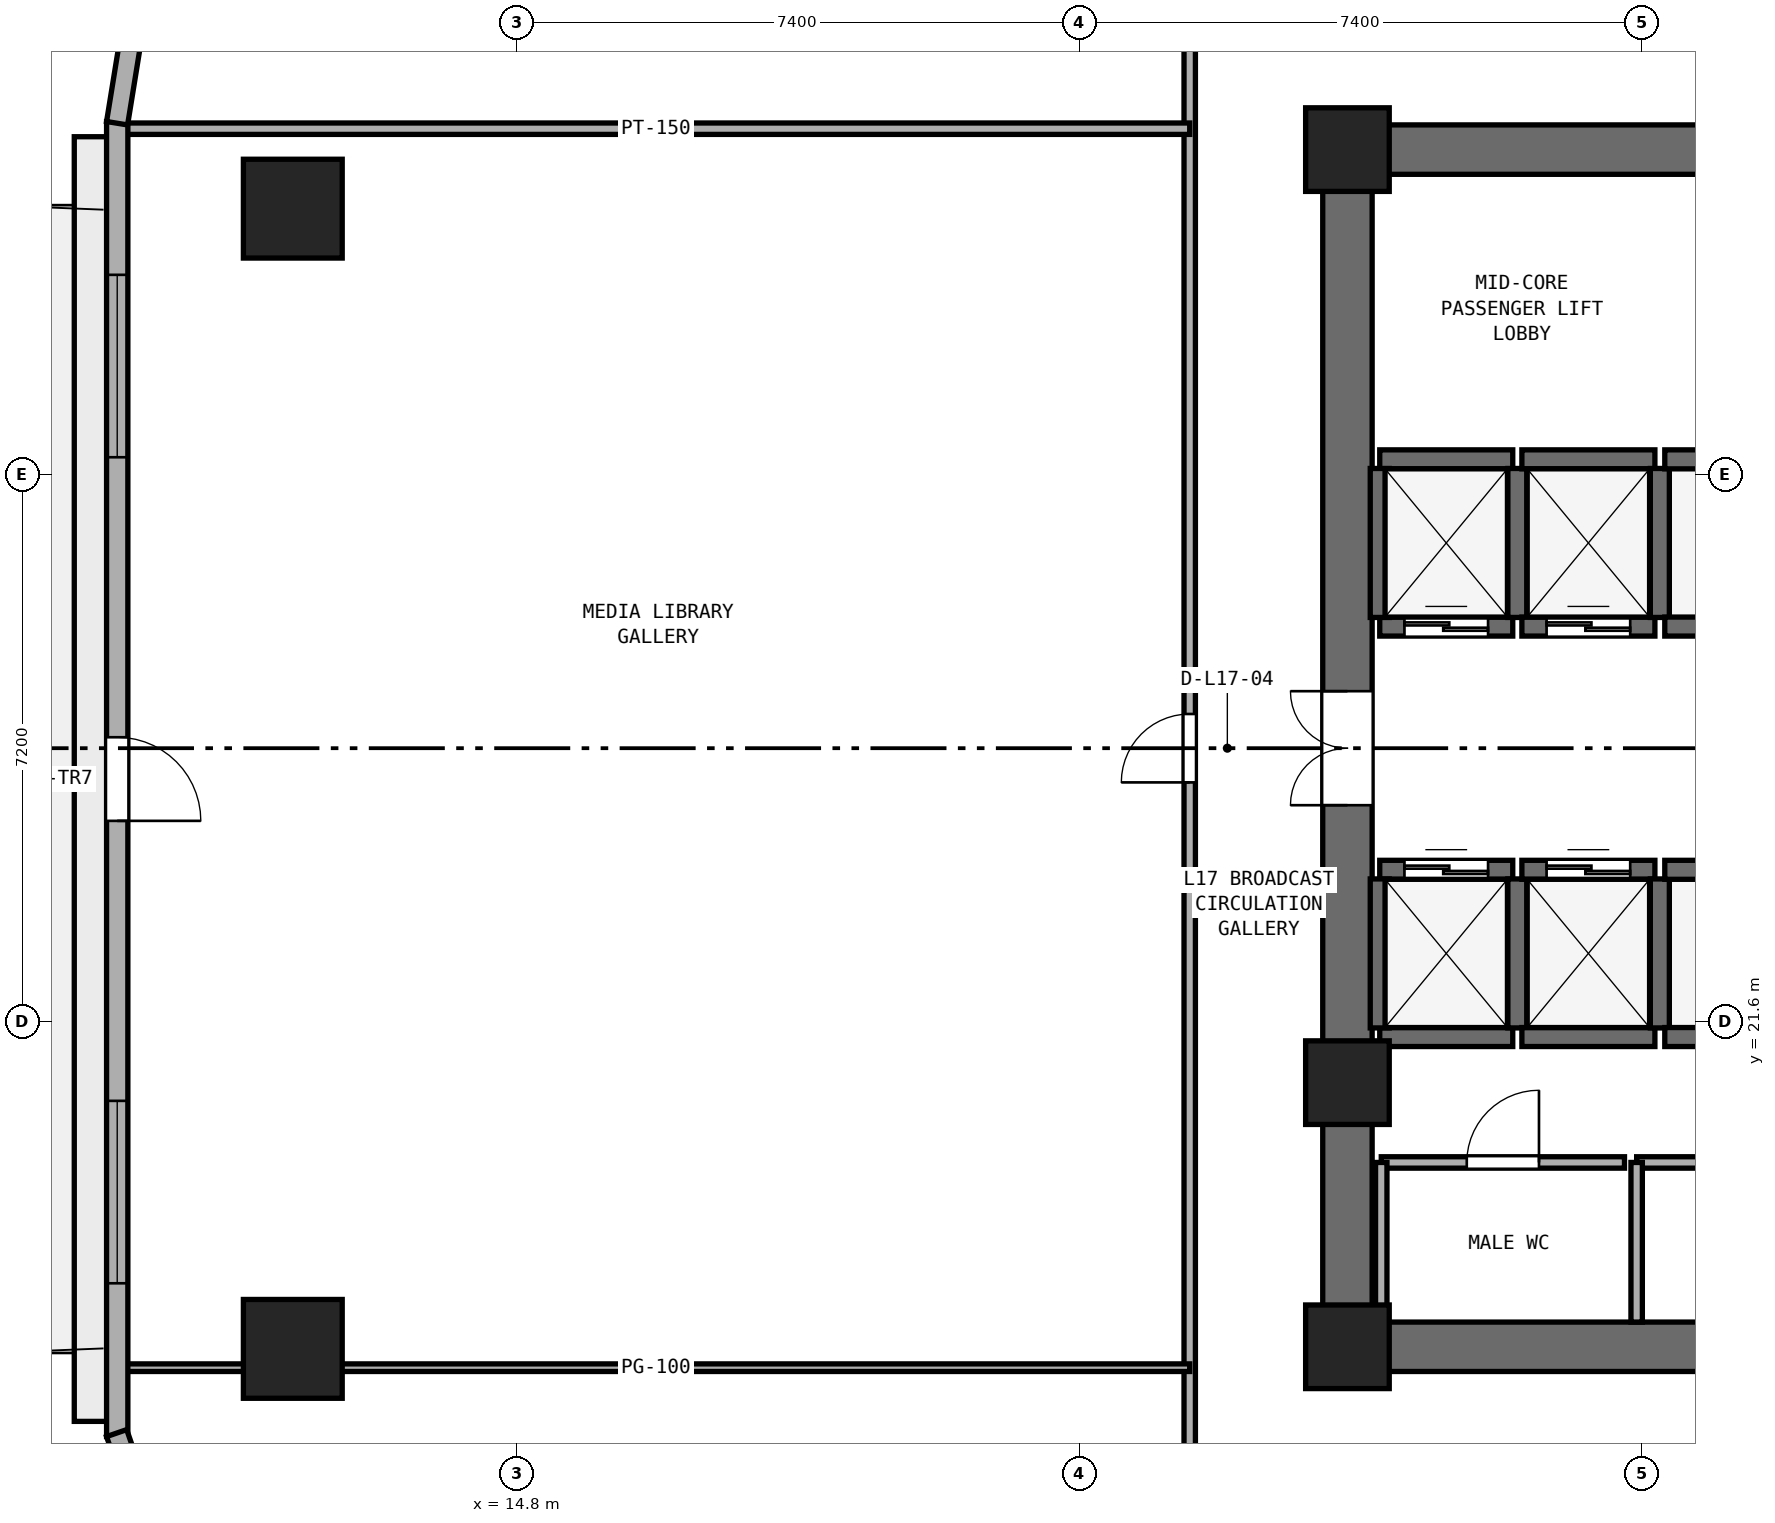
"""IFC4 building model, lengths in metres.
Left out: names, types, materials, properties, quantities, classifications, styles, units other than length and angle.
Written with IfcOpenShell. Run it as: python <this file> out.ifc"""

import sys

from ifc_helpers import new_model, si_unit, direction, frame, frame_2d, origin, origin_2d, place, context, subcontext, project, spatial, rectangle, extrude, element, fill, save


model = new_model("IFC4")
c1 = context("Model", 3, precision=1e-05, world=origin(), true_north=direction((0.0, 1.0)))
c2 = subcontext(c1, "Body", "Model", "MODEL_VIEW")
j1 = project(units=[si_unit("LENGTHUNIT", "METRE"), si_unit("PLANEANGLEUNIT", "RADIAN")], contexts=[c1])
p1 = place(None, origin())
s1 = spatial("IfcSite", under=j1, at=p1, CompositionType="ELEMENT")
p2 = place(p1, origin())
s2 = spatial("IfcBuilding", under=s1, at=p2, CompositionType="ELEMENT")
p3 = place(p2, frame((0.0, 0.0, 70.6)))
s3 = spatial("IfcBuildingStorey", under=s2, at=p3, CompositionType="ELEMENT", Elevation=70.6)
for number, where, z_axis, x_axis in (
    (1, (25.4, 17.325, 0.0), (0.0, 0.0, 1.0), (1.0, 0.0, 0.0)),
    (2, (25.4, 33.075, 0.0), (0.0, 0.0, 1.0), (1.0, 0.0, 0.0)),
):
    element("IfcWall", number, at=place(p3, frame(where, z_axis=z_axis, x_axis=x_axis)), inside=s3, PredefinedType="SHEAR", context=c2, shape_type="SweptSolid", body=[
        extrude(rectangle(XDim=23.2, YDim=0.65, at=frame_2d((11.6, 0.0))), origin(), (0.0, 0.0, 1.0), 3.525),
    ])
p4 = place(p3, frame((25.725, 17.65, 0.0), z_axis=(0.0, 0.0, 1.0), x_axis=(0.0, 1.0, 0.0)))
e3 = element("IfcWall", 3, at=p4, inside=s3, PredefinedType="SHEAR", context=c2, shape_type="SweptSolid", body=[
    extrude(rectangle(XDim=15.1, YDim=0.65, at=frame_2d((7.55, 0.0))), origin(), (0.0, 0.0, 1.0), 3.525),
])
p5 = place(p4, frame((6.8, 0.0, 0.0)))
e4 = element("IfcOpeningElement", 4, at=p5, cuts=e3, PredefinedType="OPENING", context=c2, shape_type="SweptSolid", body=[
    extrude(rectangle(XDim=1.5, YDim=2.15, at=frame_2d((0.75, 1.075))), frame((0.0, 0.335, 0.0), z_axis=(0.0, -1.0, 0.0), x_axis=(1.0, 0.0, 0.0)), (0.0, 0.0, 1.0), 0.67),
])
for number, where, z_axis, x_axis in (
    (5, (25.725, 17.325, 0.0), (0.0, 0.0, 1.0), (1.0, 0.0, 0.0)),
    (6, (25.725, 33.075, 0.0), (0.0, 0.0, 1.0), (1.0, 0.0, 0.0)),
    (7, (25.725, 20.8, 0.0), (0.0, 0.0, 1.0), (1.0, 0.0, 0.0)),
):
    element("IfcColumn", number, at=place(p3, frame(where, z_axis=z_axis, x_axis=x_axis)), inside=s3, PredefinedType="PILASTER", context=c2, shape_type="SweptSolid", body=[
        extrude(rectangle(XDim=1.1, YDim=1.1, at=origin_2d()), origin(), (0.0, 0.0, 1.0), 3.8),
    ])
for number, where, z_axis, x_axis in (
    (8, (11.85, 32.298, 0.0), (0.0, 0.0, 1.0), (1.0, 0.0, 0.0)),
    (9, (11.85, 17.298, 0.0), (0.0, 0.0, 1.0), (1.0, 0.0, 0.0)),
):
    element("IfcColumn", number, at=place(p3, frame(where, z_axis=z_axis, x_axis=x_axis)), inside=s3, PredefinedType="COLUMN", context=c2, shape_type="SweptSolid", body=[
        extrude(rectangle(XDim=1.3, YDim=1.3, at=origin_2d()), origin(), (0.0, 0.0, 1.0), 3.8),
    ])
p6 = place(p3, frame((26.15, 26.8, 0.0), z_axis=(0.0, 0.0, 1.0), x_axis=(1.0, 0.0, 0.0)))
e10 = element("IfcWall", 10, at=p6, inside=s3, PredefinedType="SHEAR", context=c2, shape_type="SweptSolid", body=[
    extrude(rectangle(XDim=1.75, YDim=0.25, at=frame_2d((0.875, 0.0))), origin(), (0.0, 0.0, 1.0), 3.525),
])
p7 = place(p6, frame((0.325, 0.0, 0.0)))
e11 = element("IfcOpeningElement", 11, at=p7, cuts=e10, PredefinedType="OPENING", context=c2, shape_type="SweptSolid", body=[
    extrude(rectangle(XDim=1.1, YDim=2.15, at=frame_2d((0.55, 1.075))), frame((0.0, 0.135, 0.0), z_axis=(0.0, -1.0, 0.0), x_axis=(1.0, 0.0, 0.0)), (0.0, 0.0, 1.0), 0.27),
])
p8 = place(p3, frame((26.15, 29.0, 0.0), z_axis=(0.0, 0.0, 1.0), x_axis=(1.0, 0.0, 0.0)))
e12 = element("IfcWall", 12, at=p8, inside=s3, PredefinedType="SHEAR", context=c2, shape_type="SweptSolid", body=[
    extrude(rectangle(XDim=1.75, YDim=0.25, at=frame_2d((0.875, 0.0))), origin(), (0.0, 0.0, 1.0), 3.525),
])
for number, where, z_axis, x_axis in (
    (13, (26.15, 26.92, 0.0), (0.0, 0.0, 1.0), (0.0, 1.0, 0.0)),
    (14, (27.96, 26.92, 0.0), (0.0, 0.0, 1.0), (0.0, 1.0, 0.0)),
):
    element("IfcWall", number, at=place(p3, frame(where, z_axis=z_axis, x_axis=x_axis)), inside=s3, PredefinedType="SHEAR", context=c2, shape_type="SweptSolid", body=[
        extrude(rectangle(XDim=1.96, YDim=0.25, at=frame_2d((0.98, 0.0))), origin(), (0.0, 0.0, 1.0), 3.525),
    ])
p9 = place(p3, frame((28.02, 26.8, 0.0), z_axis=(0.0, 0.0, 1.0), x_axis=(1.0, 0.0, 0.0)))
e15 = element("IfcWall", 15, at=p9, inside=s3, PredefinedType="SHEAR", context=c2, shape_type="SweptSolid", body=[
    extrude(rectangle(XDim=1.75, YDim=0.25, at=frame_2d((0.875, 0.0))), origin(), (0.0, 0.0, 1.0), 3.525),
])
p10 = place(p9, frame((0.325, 0.0, 0.0)))
e16 = element("IfcOpeningElement", 16, at=p10, cuts=e15, PredefinedType="OPENING", context=c2, shape_type="SweptSolid", body=[
    extrude(rectangle(XDim=1.1, YDim=2.15, at=frame_2d((0.55, 1.075))), frame((0.0, 0.135, 0.0), z_axis=(0.0, -1.0, 0.0), x_axis=(1.0, 0.0, 0.0)), (0.0, 0.0, 1.0), 0.27),
])
p11 = place(p3, frame((28.02, 29.0, 0.0), z_axis=(0.0, 0.0, 1.0), x_axis=(1.0, 0.0, 0.0)))
e17 = element("IfcWall", 17, at=p11, inside=s3, PredefinedType="SHEAR", context=c2, shape_type="SweptSolid", body=[
    extrude(rectangle(XDim=1.75, YDim=0.25, at=frame_2d((0.875, 0.0))), origin(), (0.0, 0.0, 1.0), 3.525),
])
p12 = place(p3, frame((29.835, 26.92, 0.0), z_axis=(0.0, 0.0, 1.0), x_axis=(0.0, 1.0, 0.0)))
e18 = element("IfcWall", 18, at=p12, inside=s3, PredefinedType="SHEAR", context=c2, shape_type="SweptSolid", body=[
    extrude(rectangle(XDim=1.96, YDim=0.25, at=frame_2d((0.98, 0.0))), origin(), (0.0, 0.0, 1.0), 3.525),
])
p13 = place(p3, frame((26.15, 21.4, 0.0), z_axis=(0.0, 0.0, 1.0), x_axis=(1.0, 0.0, 0.0)))
e19 = element("IfcWall", 19, at=p13, inside=s3, PredefinedType="SHEAR", context=c2, shape_type="SweptSolid", body=[
    extrude(rectangle(XDim=1.75, YDim=0.25, at=frame_2d((0.875, 0.0))), origin(), (0.0, 0.0, 1.0), 3.525),
])
p14 = place(p3, frame((26.15, 23.6, 0.0), z_axis=(0.0, 0.0, 1.0), x_axis=(1.0, 0.0, 0.0)))
e20 = element("IfcWall", 20, at=p14, inside=s3, PredefinedType="SHEAR", context=c2, shape_type="SweptSolid", body=[
    extrude(rectangle(XDim=1.75, YDim=0.25, at=frame_2d((0.875, 0.0))), origin(), (0.0, 0.0, 1.0), 3.525),
])
p15 = place(p14, frame((0.325, 0.0, 0.0)))
e21 = element("IfcOpeningElement", 21, at=p15, cuts=e20, PredefinedType="OPENING", context=c2, shape_type="SweptSolid", body=[
    extrude(rectangle(XDim=1.1, YDim=2.15, at=frame_2d((0.55, 1.075))), frame((0.0, 0.135, 0.0), z_axis=(0.0, -1.0, 0.0), x_axis=(1.0, 0.0, 0.0)), (0.0, 0.0, 1.0), 0.27),
])
for number, where, z_axis, x_axis in (
    (22, (26.15, 21.52, 0.0), (0.0, 0.0, 1.0), (0.0, 1.0, 0.0)),
    (23, (27.96, 21.52, 0.0), (0.0, 0.0, 1.0), (0.0, 1.0, 0.0)),
):
    element("IfcWall", number, at=place(p3, frame(where, z_axis=z_axis, x_axis=x_axis)), inside=s3, PredefinedType="SHEAR", context=c2, shape_type="SweptSolid", body=[
        extrude(rectangle(XDim=1.96, YDim=0.25, at=frame_2d((0.98, 0.0))), origin(), (0.0, 0.0, 1.0), 3.525),
    ])
p16 = place(p3, frame((28.02, 21.4, 0.0), z_axis=(0.0, 0.0, 1.0), x_axis=(1.0, 0.0, 0.0)))
e24 = element("IfcWall", 24, at=p16, inside=s3, PredefinedType="SHEAR", context=c2, shape_type="SweptSolid", body=[
    extrude(rectangle(XDim=1.75, YDim=0.25, at=frame_2d((0.875, 0.0))), origin(), (0.0, 0.0, 1.0), 3.525),
])
p17 = place(p3, frame((28.02, 23.6, 0.0), z_axis=(0.0, 0.0, 1.0), x_axis=(1.0, 0.0, 0.0)))
e25 = element("IfcWall", 25, at=p17, inside=s3, PredefinedType="SHEAR", context=c2, shape_type="SweptSolid", body=[
    extrude(rectangle(XDim=1.75, YDim=0.25, at=frame_2d((0.875, 0.0))), origin(), (0.0, 0.0, 1.0), 3.525),
])
p18 = place(p17, frame((0.325, 0.0, 0.0)))
e26 = element("IfcOpeningElement", 26, at=p18, cuts=e25, PredefinedType="OPENING", context=c2, shape_type="SweptSolid", body=[
    extrude(rectangle(XDim=1.1, YDim=2.15, at=frame_2d((0.55, 1.075))), frame((0.0, 0.135, 0.0), z_axis=(0.0, -1.0, 0.0), x_axis=(1.0, 0.0, 0.0)), (0.0, 0.0, 1.0), 0.27),
])
p19 = place(p3, frame((29.835, 21.52, 0.0), z_axis=(0.0, 0.0, 1.0), x_axis=(0.0, 1.0, 0.0)))
e27 = element("IfcWall", 27, at=p19, inside=s3, PredefinedType="SHEAR", context=c2, shape_type="SweptSolid", body=[
    extrude(rectangle(XDim=1.96, YDim=0.25, at=frame_2d((0.98, 0.0))), origin(), (0.0, 0.0, 1.0), 3.525),
])
for number, where, z_axis, x_axis in (
    (28, (29.9, 21.4, 0.0), (0.0, 0.0, 1.0), (1.0, 0.0, 0.0)),
    (29, (29.9, 23.6, 0.0), (0.0, 0.0, 1.0), (1.0, 0.0, 0.0)),
    (30, (29.9, 26.8, 0.0), (0.0, 0.0, 1.0), (1.0, 0.0, 0.0)),
    (31, (29.9, 29.0, 0.0), (0.0, 0.0, 1.0), (1.0, 0.0, 0.0)),
):
    element("IfcWall", number, at=place(p3, frame(where, z_axis=z_axis, x_axis=x_axis)), inside=s3, PredefinedType="SHEAR", context=c2, shape_type="SweptSolid", body=[
        extrude(rectangle(XDim=1.72, YDim=0.25, at=frame_2d((0.86, 0.0))), origin(), (0.0, 0.0, 1.0), 3.525),
    ])
p20 = place(p3, frame((26.17, 19.75, 0.0), z_axis=(0.0, 0.0, 1.0), x_axis=(1.0, 0.0, 0.0)))
e32 = element("IfcWall", 32, at=p20, inside=s3, PredefinedType="PARTITIONING", context=c2, shape_type="SweptSolid", body=[
    extrude(rectangle(XDim=3.2, YDim=0.15, at=frame_2d((1.6, 0.0))), origin(), (0.0, 0.0, 1.0), 3.525),
])
p21 = place(p20, frame((1.125, 0.0, 0.0)))
e33 = element("IfcOpeningElement", 33, at=p21, cuts=e32, PredefinedType="OPENING", context=c2, shape_type="SweptSolid", body=[
    extrude(rectangle(XDim=0.95, YDim=2.1, at=frame_2d((0.475, 1.05))), frame((0.0, 0.085, 0.0), z_axis=(0.0, -1.0, 0.0), x_axis=(1.0, 0.0, 0.0)), (0.0, 0.0, 1.0), 0.17),
])
p22 = place(p3, frame((26.17, 17.65, 0.0), z_axis=(0.0, 0.0, 1.0), x_axis=(0.0, 1.0, 0.0)))
e34 = element("IfcWall", 34, at=p22, inside=s3, PredefinedType="PARTITIONING", context=c2, shape_type="SweptSolid", body=[
    extrude(rectangle(XDim=2.1, YDim=0.15, at=frame_2d((1.05, 0.0))), origin(), (0.0, 0.0, 1.0), 3.525),
])
p23 = place(p3, frame((29.53, 19.75, 0.0), z_axis=(0.0, 0.0, 1.0), x_axis=(1.0, 0.0, 0.0)))
e35 = element("IfcWall", 35, at=p23, inside=s3, PredefinedType="PARTITIONING", context=c2, shape_type="SweptSolid", body=[
    extrude(rectangle(XDim=3.24, YDim=0.15, at=frame_2d((1.62, 0.0))), origin(), (0.0, 0.0, 1.0), 3.525),
])
p24 = place(p23, frame((1.145, 0.0, 0.0)))
e36 = element("IfcOpeningElement", 36, at=p24, cuts=e35, PredefinedType="OPENING", context=c2, shape_type="SweptSolid", body=[
    extrude(rectangle(XDim=0.95, YDim=2.1, at=frame_2d((0.475, 1.05))), frame((0.0, 0.085, 0.0), z_axis=(0.0, -1.0, 0.0), x_axis=(1.0, 0.0, 0.0)), (0.0, 0.0, 1.0), 0.17),
])
p25 = place(p3, frame((29.53, 17.65, 0.0), z_axis=(0.0, 0.0, 1.0), x_axis=(0.0, 1.0, 0.0)))
e37 = element("IfcWall", 37, at=p25, inside=s3, PredefinedType="PARTITIONING", context=c2, shape_type="SweptSolid", body=[
    extrude(rectangle(XDim=2.1, YDim=0.15, at=frame_2d((1.05, 0.0))), origin(), (0.0, 0.0, 1.0), 3.525),
])
p26 = place(p3, frame((23.65, 15.25, 0.0), z_axis=(0.0, 0.0, 1.0), x_axis=(0.0, 1.0, 0.0)))
e38 = element("IfcWall", 38, at=p26, inside=s3, PredefinedType="PARTITIONING", context=c2, shape_type="SweptSolid", body=[
    extrude(rectangle(XDim=19.9, YDim=0.15, at=frame_2d((9.95, 0.0))), origin(), (0.0, 0.0, 1.0), 3.525),
])
p27 = place(p26, frame((9.5, 0.0, 0.0)))
e39 = element("IfcOpeningElement", 39, at=p27, cuts=e38, PredefinedType="OPENING", context=c2, shape_type="SweptSolid", body=[
    extrude(rectangle(XDim=0.9, YDim=2.1, at=frame_2d((0.45, 1.05))), frame((0.0, 0.085, 0.0), z_axis=(0.0, -1.0, 0.0), x_axis=(1.0, 0.0, 0.0)), (0.0, 0.0, 1.0), 0.17),
])
p28 = place(p3, frame((9.605, 17.05, 0.0), z_axis=(0.0, 0.0, 1.0), x_axis=(1.0, 0.0, 0.0)))
e40 = element("IfcWall", 40, at=p28, inside=s3, PredefinedType="PARTITIONING", context=c2, shape_type="SweptSolid", body=[
    extrude(rectangle(XDim=14.045, YDim=0.1, at=frame_2d((7.022, 0.0))), origin(), (0.0, 0.0, 1.0), 3.525),
])
p29 = place(p3, frame((9.605, 33.35, 0.0), z_axis=(0.0, 0.0, 1.0), x_axis=(1.0, 0.0, 0.0)))
e41 = element("IfcWall", 41, at=p29, inside=s3, PredefinedType="PARTITIONING", context=c2, shape_type="SweptSolid", body=[
    extrude(rectangle(XDim=14.045, YDim=0.15, at=frame_2d((7.022, 0.0))), origin(), (0.0, 0.0, 1.0), 3.525),
])
p30 = place(p3, frame((9.54, 33.444, 0.0), z_axis=(0.0, 0.0, 1.0), x_axis=(0.0, -1.0, 0.0)))
e42 = element("IfcWall", 42, at=p30, inside=s3, PredefinedType="STANDARD", context=c2, shape_type="SweptSolid", body=[
    extrude(rectangle(XDim=17.301, YDim=0.28, at=frame_2d((8.65, 0.0))), origin(), (0.0, 0.0, 1.0), 3.525),
])
p31 = place(p30, frame((8.1, 0.0, 0.0)))
e43 = element("IfcOpeningElement", 43, at=p31, cuts=e42, PredefinedType="OPENING", context=c2, shape_type="SweptSolid", body=[
    extrude(rectangle(XDim=1.1, YDim=2.2, at=frame_2d((0.55, 1.1))), frame((0.0, 0.15, 0.0), z_axis=(0.0, -1.0, 0.0), x_axis=(1.0, 0.0, 0.0)), (0.0, 0.0, 1.0), 0.3),
])
p32 = place(p30, frame((2.017, 0.0, 0.9)))
e44 = element("IfcOpeningElement", 44, at=p32, cuts=e42, PredefinedType="OPENING", context=c2, shape_type="SweptSolid", body=[
    extrude(rectangle(XDim=2.4, YDim=1.75, at=frame_2d((1.2, 0.875))), frame((0.0, 0.15, 0.0), z_axis=(0.0, -1.0, 0.0), x_axis=(1.0, 0.0, 0.0)), (0.0, 0.0, 1.0), 0.3),
])
p33 = place(p30, frame((12.884, 0.0, 0.9)))
e45 = element("IfcOpeningElement", 45, at=p33, cuts=e42, PredefinedType="OPENING", context=c2, shape_type="SweptSolid", body=[
    extrude(rectangle(XDim=2.4, YDim=1.75, at=frame_2d((1.2, 0.875))), frame((0.0, 0.15, 0.0), z_axis=(0.0, -1.0, 0.0), x_axis=(1.0, 0.0, 0.0)), (0.0, 0.0, 1.0), 0.3),
])
p34 = place(p3, frame((9.753, 34.749, 0.0), z_axis=(0.0, 0.0, 1.0), x_axis=(-0.160037671962, -0.987110907423, 0.0)))
e46 = element("IfcWall", 46, at=p34, inside=s3, PredefinedType="STANDARD", context=c2, shape_type="SweptSolid", body=[
    extrude(rectangle(XDim=1.344, YDim=0.28, at=frame_2d((0.672, 0.0))), origin(), (0.0, 0.0, 1.0), 3.525),
])
p35 = place(p3, frame((9.532, 16.189, 0.0), z_axis=(0.0, 0.0, 1.0), x_axis=(0.32708309668, -0.944995580871, 0.0)))
e47 = element("IfcWall", 47, at=p35, inside=s3, PredefinedType="STANDARD", context=c2, shape_type="SweptSolid", body=[
    extrude(rectangle(XDim=2.748, YDim=0.28, at=frame_2d((1.374, 0.0))), origin(), (0.0, 0.0, 1.0), 3.525),
])
p36 = place(p7, origin())
e48 = element("IfcDoor", 48, at=p36, inside=s3, OperationType="DOUBLE_DOOR_SLIDING", PredefinedType="DOOR", context=c2, shape_type="SweptSolid", body=[
    extrude(rectangle(XDim=1.1, YDim=2.15, at=frame_2d((0.55, 1.075))), frame((0.0, 0.025, 0.0), z_axis=(0.0, -1.0, 0.0), x_axis=(1.0, 0.0, 0.0)), (0.0, 0.0, 1.0), 0.05),
])
fill(e11, e48)
p37 = place(p10, origin())
e49 = element("IfcDoor", 49, at=p37, inside=s3, OperationType="DOUBLE_DOOR_SLIDING", PredefinedType="DOOR", context=c2, shape_type="SweptSolid", body=[
    extrude(rectangle(XDim=1.1, YDim=2.15, at=frame_2d((0.55, 1.075))), frame((0.0, 0.025, 0.0), z_axis=(0.0, -1.0, 0.0), x_axis=(1.0, 0.0, 0.0)), (0.0, 0.0, 1.0), 0.05),
])
fill(e16, e49)
p38 = place(p15, origin())
e50 = element("IfcDoor", 50, at=p38, inside=s3, OperationType="DOUBLE_DOOR_SLIDING", PredefinedType="DOOR", context=c2, shape_type="SweptSolid", body=[
    extrude(rectangle(XDim=1.1, YDim=2.15, at=frame_2d((0.55, 1.075))), frame((0.0, 0.025, 0.0), z_axis=(0.0, -1.0, 0.0), x_axis=(1.0, 0.0, 0.0)), (0.0, 0.0, 1.0), 0.05),
])
fill(e21, e50)
p39 = place(p18, origin())
e51 = element("IfcDoor", 51, at=p39, inside=s3, OperationType="DOUBLE_DOOR_SLIDING", PredefinedType="DOOR", context=c2, shape_type="SweptSolid", body=[
    extrude(rectangle(XDim=1.1, YDim=2.15, at=frame_2d((0.55, 1.075))), frame((0.0, 0.025, 0.0), z_axis=(0.0, -1.0, 0.0), x_axis=(1.0, 0.0, 0.0)), (0.0, 0.0, 1.0), 0.05),
])
fill(e26, e51)
p40 = place(p5, origin())
e52 = element("IfcDoor", 52, at=p40, inside=s3, OperationType="DOUBLE_DOOR_SINGLE_SWING", PredefinedType="DOOR", context=c2, shape_type="SweptSolid", body=[
    extrude(rectangle(XDim=1.5, YDim=2.15, at=frame_2d((0.75, 1.075))), frame((0.0, 0.025, 0.0), z_axis=(0.0, -1.0, 0.0), x_axis=(1.0, 0.0, 0.0)), (0.0, 0.0, 1.0), 0.05),
])
fill(e4, e52)
p41 = place(p21, origin())
e53 = element("IfcDoor", 53, at=p41, inside=s3, OperationType="SINGLE_SWING_RIGHT", PredefinedType="DOOR", context=c2, shape_type="SweptSolid", body=[
    extrude(rectangle(XDim=0.95, YDim=2.1, at=frame_2d((0.475, 1.05))), frame((0.0, 0.025, 0.0), z_axis=(0.0, -1.0, 0.0), x_axis=(1.0, 0.0, 0.0)), (0.0, 0.0, 1.0), 0.05),
])
fill(e33, e53)
p42 = place(p27, origin())
e54 = element("IfcDoor", 54, at=p42, inside=s3, OperationType="SINGLE_SWING_LEFT", PredefinedType="DOOR", context=c2, shape_type="SweptSolid", body=[
    extrude(rectangle(XDim=0.9, YDim=2.1, at=frame_2d((0.45, 1.05))), frame((0.0, 0.025, 0.0), z_axis=(0.0, -1.0, 0.0), x_axis=(1.0, 0.0, 0.0)), (0.0, 0.0, 1.0), 0.05),
])
fill(e39, e54)
p43 = place(p31, origin())
e55 = element("IfcDoor", 55, at=p43, inside=s3, OperationType="SINGLE_SWING_RIGHT", PredefinedType="DOOR", context=c2, shape_type="SweptSolid", body=[
    extrude(rectangle(XDim=1.1, YDim=2.2, at=frame_2d((0.55, 1.1))), frame((0.0, 0.025, 0.0), z_axis=(0.0, -1.0, 0.0), x_axis=(1.0, 0.0, 0.0)), (0.0, 0.0, 1.0), 0.05),
])
fill(e43, e55)
p44 = place(p32, origin())
e56 = element("IfcWindow", 56, at=p44, inside=s3, PartitioningType="SINGLE_PANEL", PredefinedType="WINDOW", context=c2, shape_type="SweptSolid", body=[
    extrude(rectangle(XDim=2.4, YDim=1.75, at=frame_2d((1.2, 0.875))), frame((0.0, 0.03, 0.0), z_axis=(0.0, -1.0, 0.0), x_axis=(1.0, 0.0, 0.0)), (0.0, 0.0, 1.0), 0.06),
])
fill(e44, e56)
p45 = place(p33, origin())
e57 = element("IfcWindow", 57, at=p45, inside=s3, PartitioningType="SINGLE_PANEL", PredefinedType="WINDOW", context=c2, shape_type="SweptSolid", body=[
    extrude(rectangle(XDim=2.4, YDim=1.75, at=frame_2d((1.2, 0.875))), frame((0.0, 0.03, 0.0), z_axis=(0.0, -1.0, 0.0), x_axis=(1.0, 0.0, 0.0)), (0.0, 0.0, 1.0), 0.06),
])
fill(e45, e57)
save(model, sys.argv[1])
